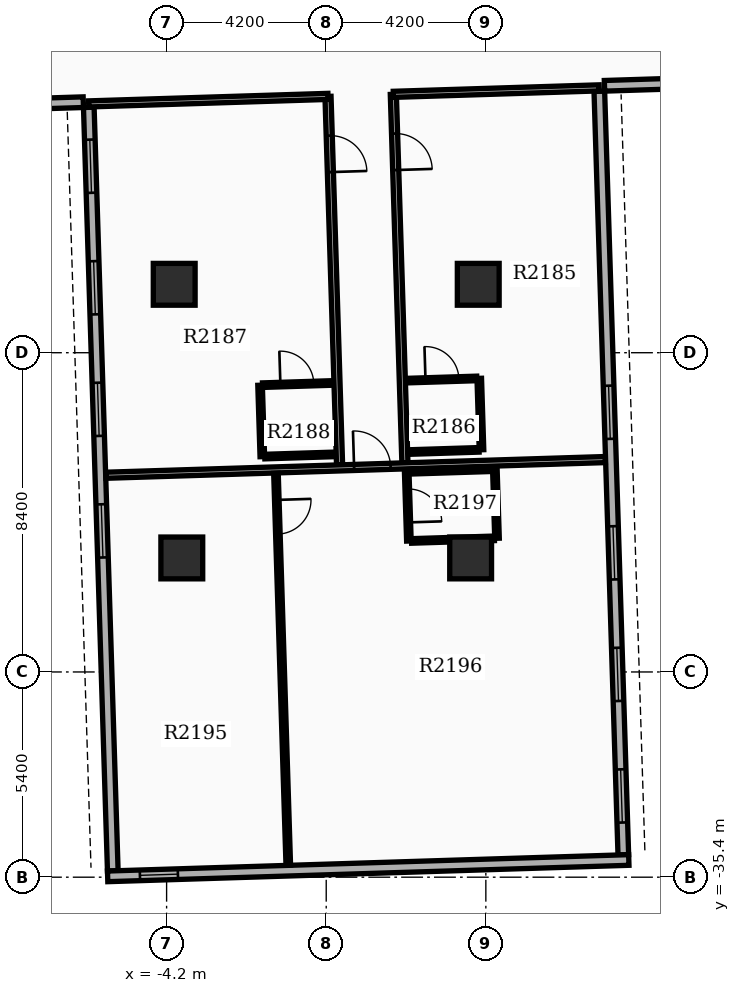
"""IFC4 building model, lengths in metres.
Left out: names, types, materials, properties, quantities, classifications, styles, units other than length and angle.
Written with IfcOpenShell. Run it as: python <this file> out.ifc"""

import sys

from ifc_helpers import new_model, si_unit, direction, frame, frame_2d, origin, origin_2d, place, context, subcontext, project, spatial, rectangle, extrude, element, fill, save


model = new_model("IFC4")
c1 = context("Model", 3, precision=1e-05, world=origin(), true_north=direction((0.0, 1.0)))
c2 = subcontext(c1, "Body", "Model", "MODEL_VIEW")
j1 = project(units=[si_unit("LENGTHUNIT", "METRE"), si_unit("PLANEANGLEUNIT", "RADIAN")], contexts=[c1])
p1 = place(None, origin())
s1 = spatial("IfcSite", under=j1, at=p1, CompositionType="ELEMENT")
p2 = place(p1, origin())
s2 = spatial("IfcBuilding", under=s1, at=p2, CompositionType="ELEMENT")
p3 = place(p2, frame((0.0, 0.0, 135.9)))
s3 = spatial("IfcBuildingStorey", under=s2, at=p3, CompositionType="ELEMENT", Elevation=135.9)
for number, where, z_axis, x_axis in (
    (1, (-4.0, -19.8, 0.0), (0.0, 0.0, 1.0), (1.0, 0.0, 0.0)),
    (2, (4.0, -19.8, 0.0), (0.0, 0.0, 1.0), (1.0, 0.0, 0.0)),
    (3, (-3.8, -27.0, 0.0), (0.0, 0.0, 1.0), (1.0, 0.0, 0.0)),
    (4, (3.8, -27.0, 0.0), (0.0, 0.0, 1.0), (1.0, 0.0, 0.0)),
):
    element("IfcColumn", number, at=place(p3, frame(where, z_axis=z_axis, x_axis=x_axis)), inside=s3, PredefinedType="COLUMN", context=c2, shape_type="SweptSolid", body=[
        extrude(rectangle(XDim=1.1, YDim=1.1, at=origin_2d()), origin(), (0.0, 0.0, 1.0), 3.9),
    ])
p4 = place(p3, frame((-6.247, -15.144, 0.0), z_axis=(0.0, 0.0, 1.0), x_axis=(0.031398187845, -0.999506955354, 0.0)))
e5 = element("IfcWall", 5, at=p4, inside=s3, PredefinedType="STANDARD", context=c2, shape_type="SweptSolid", body=[
    extrude(rectangle(XDim=20.1, YDim=0.28, at=frame_2d((10.05, 0.0))), origin(), (0.0, 0.0, 1.0), 2.97),
])
p5 = place(p4, frame((0.85, 0.0, 0.8)))
e6 = element("IfcOpeningElement", 6, at=p5, cuts=e5, PredefinedType="OPENING", context=c2, shape_type="SweptSolid", body=[
    extrude(rectangle(XDim=1.4, YDim=1.6, at=frame_2d((0.7, 0.8))), frame((0.0, 0.15, 0.0), z_axis=(0.0, -1.0, 0.0), x_axis=(1.0, 0.0, 0.0)), (0.0, 0.0, 1.0), 0.3),
])
p6 = place(p4, frame((4.05, 0.0, 0.8)))
e7 = element("IfcOpeningElement", 7, at=p6, cuts=e5, PredefinedType="OPENING", context=c2, shape_type="SweptSolid", body=[
    extrude(rectangle(XDim=1.4, YDim=1.6, at=frame_2d((0.7, 0.8))), frame((0.0, 0.15, 0.0), z_axis=(0.0, -1.0, 0.0), x_axis=(1.0, 0.0, 0.0)), (0.0, 0.0, 1.0), 0.3),
])
p7 = place(p4, frame((7.25, 0.0, 0.8)))
e8 = element("IfcOpeningElement", 8, at=p7, cuts=e5, PredefinedType="OPENING", context=c2, shape_type="SweptSolid", body=[
    extrude(rectangle(XDim=1.4, YDim=1.6, at=frame_2d((0.7, 0.8))), frame((0.0, 0.15, 0.0), z_axis=(0.0, -1.0, 0.0), x_axis=(1.0, 0.0, 0.0)), (0.0, 0.0, 1.0), 0.3),
])
p8 = place(p4, frame((10.45, 0.0, 0.8)))
e9 = element("IfcOpeningElement", 9, at=p8, cuts=e5, PredefinedType="OPENING", context=c2, shape_type="SweptSolid", body=[
    extrude(rectangle(XDim=1.4, YDim=1.6, at=frame_2d((0.7, 0.8))), frame((0.0, 0.15, 0.0), z_axis=(0.0, -1.0, 0.0), x_axis=(1.0, 0.0, 0.0)), (0.0, 0.0, 1.0), 0.3),
])
p9 = place(p3, frame((7.817, -34.812, 0.0), z_axis=(0.0, 0.0, 1.0), x_axis=(-0.031410322165, 0.999506574096, 0.0)))
e10 = element("IfcWall", 10, at=p9, inside=s3, PredefinedType="STANDARD", context=c2, shape_type="SweptSolid", body=[
    extrude(rectangle(XDim=20.1, YDim=0.28, at=frame_2d((10.05, 0.0))), origin(), (0.0, 0.0, 1.0), 2.97),
])
p10 = place(p9, frame((0.85, 0.0, 0.8)))
e11 = element("IfcOpeningElement", 11, at=p10, cuts=e10, PredefinedType="OPENING", context=c2, shape_type="SweptSolid", body=[
    extrude(rectangle(XDim=1.4, YDim=1.6, at=frame_2d((0.7, 0.8))), frame((0.0, 0.15, 0.0), z_axis=(0.0, -1.0, 0.0), x_axis=(1.0, 0.0, 0.0)), (0.0, 0.0, 1.0), 0.3),
])
p11 = place(p9, frame((4.05, 0.0, 0.8)))
e12 = element("IfcOpeningElement", 12, at=p11, cuts=e10, PredefinedType="OPENING", context=c2, shape_type="SweptSolid", body=[
    extrude(rectangle(XDim=1.4, YDim=1.6, at=frame_2d((0.7, 0.8))), frame((0.0, 0.15, 0.0), z_axis=(0.0, -1.0, 0.0), x_axis=(1.0, 0.0, 0.0)), (0.0, 0.0, 1.0), 0.3),
])
p12 = place(p9, frame((7.25, 0.0, 0.8)))
e13 = element("IfcOpeningElement", 13, at=p12, cuts=e10, PredefinedType="OPENING", context=c2, shape_type="SweptSolid", body=[
    extrude(rectangle(XDim=1.4, YDim=1.6, at=frame_2d((0.7, 0.8))), frame((0.0, 0.15, 0.0), z_axis=(0.0, -1.0, 0.0), x_axis=(1.0, 0.0, 0.0)), (0.0, 0.0, 1.0), 0.3),
])
p13 = place(p9, frame((10.95, 0.0, 0.8)))
e14 = element("IfcOpeningElement", 14, at=p13, cuts=e10, PredefinedType="OPENING", context=c2, shape_type="SweptSolid", body=[
    extrude(rectangle(XDim=1.4, YDim=1.6, at=frame_2d((0.7, 0.8))), frame((0.0, 0.15, 0.0), z_axis=(0.0, -1.0, 0.0), x_axis=(1.0, 0.0, 0.0)), (0.0, 0.0, 1.0), 0.3),
])
p14 = place(p3, frame((-5.752, -35.378, 0.0), z_axis=(0.0, 0.0, 1.0), x_axis=(0.999506679556, 0.031406966164, 0.0)))
e15 = element("IfcWall", 15, at=p14, inside=s3, PredefinedType="STANDARD", context=c2, shape_type="SweptSolid", body=[
    extrude(rectangle(XDim=13.72, YDim=0.28, at=frame_2d((6.86, 0.0))), origin(), (0.0, 0.0, 1.0), 2.97),
])
p15 = place(p14, frame((0.85, 0.0, 0.85)))
e16 = element("IfcOpeningElement", 16, at=p15, cuts=e15, PredefinedType="OPENING", context=c2, shape_type="SweptSolid", body=[
    extrude(rectangle(XDim=1.0, YDim=1.5, at=frame_2d((0.5, 0.75))), frame((0.0, 0.15, 0.0), z_axis=(0.0, -1.0, 0.0), x_axis=(1.0, 0.0, 0.0)), (0.0, 0.0, 1.0), 0.3),
])
p16 = place(p3, frame((-12.689, -15.206, 0.0), z_axis=(0.0, 0.0, 1.0), x_axis=(0.999507262922, 0.031388395416, 0.0)))
e17 = element("IfcWall", 17, at=p16, inside=s3, PredefinedType="STANDARD", context=c2, shape_type="SweptSolid", body=[
    extrude(rectangle(XDim=6.3, YDim=0.28, at=frame_2d((3.15, 0.0))), origin(), (0.0, 0.0, 1.0), 2.97),
])
p17 = place(p3, frame((13.618, -14.379, 0.0), z_axis=(0.0, 0.0, 1.0), x_axis=(-0.999507224741, -0.031389611199, 0.0)))
e18 = element("IfcWall", 18, at=p17, inside=s3, PredefinedType="STANDARD", context=c2, shape_type="SweptSolid", body=[
    extrude(rectangle(XDim=6.3, YDim=0.28, at=frame_2d((3.15, 0.0))), origin(), (0.0, 0.0, 1.0), 2.97),
])
p18 = place(p3, frame((1.766, -14.802, 0.0), z_axis=(0.0, 0.0, 1.0), x_axis=(0.031410762168, -0.999506560269, 0.0)))
e19 = element("IfcWall", 19, at=p18, inside=s3, PredefinedType="PARTITIONING", context=c2, shape_type="SweptSolid", body=[
    extrude(rectangle(XDim=9.7, YDim=0.16, at=frame_2d((4.85, 0.0))), origin(), (0.0, 0.0, 1.0), 2.96),
])
p19 = place(p18, frame((1.033, 0.0, 0.0)))
e20 = element("IfcOpeningElement", 20, at=p19, cuts=e19, PredefinedType="OPENING", context=c2, shape_type="SweptSolid", body=[
    extrude(rectangle(XDim=0.96, YDim=2.15, at=frame_2d((0.48, 1.075))), frame((0.0, 0.09, 0.0), z_axis=(0.0, -1.0, 0.0), x_axis=(1.0, 0.0, 0.0)), (0.0, 0.0, 1.0), 0.18),
])
p20 = place(p3, frame((1.766, -14.802, 0.0), z_axis=(0.0, 0.0, 1.0), x_axis=(0.999507009157, 0.031396475072, 0.0)))
e21 = element("IfcWall", 21, at=p20, inside=s3, PredefinedType="PARTITIONING", context=c2, shape_type="SweptSolid", body=[
    extrude(rectangle(XDim=5.42, YDim=0.16, at=frame_2d((2.71, 0.0))), origin(), (0.0, 0.0, 1.0), 2.96),
])
p21 = place(p3, frame((2.143, -22.334, 0.0), z_axis=(0.0, 0.0, 1.0), x_axis=(0.999507221803, 0.031389704724, 0.0)))
e22 = element("IfcWall", 22, at=p21, inside=s3, PredefinedType="PARTITIONING", context=c2, shape_type="SweptSolid", body=[
    extrude(rectangle(XDim=1.82, YDim=0.12, at=frame_2d((0.91, 0.0))), origin(), (0.0, 0.0, 1.0), 2.96),
])
p22 = place(p21, frame((0.47, 0.0, 0.0)))
e23 = element("IfcOpeningElement", 23, at=p22, cuts=e22, PredefinedType="OPENING", context=c2, shape_type="SweptSolid", body=[
    extrude(rectangle(XDim=0.88, YDim=2.1, at=frame_2d((0.44, 1.05))), frame((0.0, 0.07, 0.0), z_axis=(0.0, -1.0, 0.0), x_axis=(1.0, 0.0, 0.0)), (0.0, 0.0, 1.0), 0.14),
])
p23 = place(p3, frame((2.202, -24.213, 0.0), z_axis=(0.0, 0.0, 1.0), x_axis=(0.999503004171, 0.03152371574, 0.0)))
e24 = element("IfcWall", 24, at=p23, inside=s3, PredefinedType="PARTITIONING", context=c2, shape_type="SweptSolid", body=[
    extrude(rectangle(XDim=1.82, YDim=0.12, at=frame_2d((0.91, 0.0))), origin(), (0.0, 0.0, 1.0), 2.96),
])
p24 = place(p3, frame((4.027, -22.274, 0.0), z_axis=(0.0, 0.0, 1.0), x_axis=(0.031425292588, -0.999506103526, 0.0)))
e25 = element("IfcWall", 25, at=p24, inside=s3, PredefinedType="PARTITIONING", context=c2, shape_type="SweptSolid", body=[
    extrude(rectangle(XDim=1.88, YDim=0.12, at=frame_2d((0.94, 0.0))), origin(), (0.0, 0.0, 1.0), 2.96),
])
p25 = place(p3, frame((0.047, -14.856, 0.0), z_axis=(0.0, 0.0, 1.0), x_axis=(0.031411552371, -0.999506535435, 0.0)))
e26 = element("IfcWall", 26, at=p25, inside=s3, PredefinedType="PARTITIONING", context=c2, shape_type="SweptSolid", body=[
    extrude(rectangle(XDim=9.7, YDim=0.16, at=frame_2d((4.85, 0.0))), origin(), (0.0, 0.0, 1.0), 2.96),
])
p26 = place(p25, frame((1.033, 0.0, 0.0)))
e27 = element("IfcOpeningElement", 27, at=p26, cuts=e26, PredefinedType="OPENING", context=c2, shape_type="SweptSolid", body=[
    extrude(rectangle(XDim=0.96, YDim=2.15, at=frame_2d((0.48, 1.075))), frame((0.0, 0.09, 0.0), z_axis=(0.0, -1.0, 0.0), x_axis=(1.0, 0.0, 0.0)), (0.0, 0.0, 1.0), 0.18),
])
p27 = place(p3, frame((0.047, -14.856, 0.0), z_axis=(0.0, 0.0, 1.0), x_axis=(-0.999507224741, -0.031389611199, 0.0)))
e28 = element("IfcWall", 28, at=p27, inside=s3, PredefinedType="PARTITIONING", context=c2, shape_type="SweptSolid", body=[
    extrude(rectangle(XDim=6.3, YDim=0.16, at=frame_2d((3.15, 0.0))), origin(), (0.0, 0.0, 1.0), 2.96),
])
p28 = place(p3, frame((-1.676, -22.454, 0.0), z_axis=(0.0, 0.0, 1.0), x_axis=(0.999507221803, 0.031389704724, 0.0)))
e29 = element("IfcWall", 29, at=p28, inside=s3, PredefinedType="PARTITIONING", context=c2, shape_type="SweptSolid", body=[
    extrude(rectangle(XDim=1.82, YDim=0.12, at=frame_2d((0.91, 0.0))), origin(), (0.0, 0.0, 1.0), 2.96),
])
p29 = place(p28, frame((0.47, 0.0, 0.0)))
e30 = element("IfcOpeningElement", 30, at=p29, cuts=e29, PredefinedType="OPENING", context=c2, shape_type="SweptSolid", body=[
    extrude(rectangle(XDim=0.88, YDim=2.1, at=frame_2d((0.44, 1.05))), frame((0.0, 0.07, 0.0), z_axis=(0.0, -1.0, 0.0), x_axis=(1.0, 0.0, 0.0)), (0.0, 0.0, 1.0), 0.14),
])
p30 = place(p3, frame((-1.616, -24.333, 0.0), z_axis=(0.0, 0.0, 1.0), x_axis=(0.999507221803, 0.031389704724, 0.0)))
e31 = element("IfcWall", 31, at=p30, inside=s3, PredefinedType="PARTITIONING", context=c2, shape_type="SweptSolid", body=[
    extrude(rectangle(XDim=1.82, YDim=0.12, at=frame_2d((0.91, 0.0))), origin(), (0.0, 0.0, 1.0), 2.96),
])
p31 = place(p3, frame((-1.74, -22.456, 0.0), z_axis=(0.0, 0.0, 1.0), x_axis=(0.031429371883, -0.999505975261, 0.0)))
e32 = element("IfcWall", 32, at=p31, inside=s3, PredefinedType="PARTITIONING", context=c2, shape_type="SweptSolid", body=[
    extrude(rectangle(XDim=1.88, YDim=0.12, at=frame_2d((0.94, 0.0))), origin(), (0.0, 0.0, 1.0), 2.96),
])
p32 = place(p3, frame((-5.795, -24.824, 0.0), z_axis=(0.0, 0.0, 1.0), x_axis=(0.999507189267, 0.031390740738, 0.0)))
e33 = element("IfcWall", 33, at=p32, inside=s3, PredefinedType="PARTITIONING", context=c2, shape_type="SweptSolid", body=[
    extrude(rectangle(XDim=13.144, YDim=0.16, at=frame_2d((6.572, 0.0))), origin(), (0.0, 0.0, 1.0), 2.96),
])
p33 = place(p32, frame((6.532, 0.0, 0.0)))
e34 = element("IfcOpeningElement", 34, at=p33, cuts=e33, PredefinedType="OPENING", context=c2, shape_type="SweptSolid", body=[
    extrude(rectangle(XDim=0.96, YDim=2.15, at=frame_2d((0.48, 1.075))), frame((0.0, 0.09, 0.0), z_axis=(0.0, -1.0, 0.0), x_axis=(1.0, 0.0, 0.0)), (0.0, 0.0, 1.0), 0.18),
])
p34 = place(p3, frame((-1.323, -24.774, 0.0), z_axis=(0.0, 0.0, 1.0), x_axis=(0.031416574993, -0.999506377576, 0.0)))
e35 = element("IfcWall", 35, at=p34, inside=s3, PredefinedType="PARTITIONING", context=c2, shape_type="SweptSolid", body=[
    extrude(rectangle(XDim=10.312, YDim=0.12, at=frame_2d((5.156, 0.0))), origin(), (0.0, 0.0, 1.0), 2.96),
])
p35 = place(p34, frame((0.7, 0.0, 0.0)))
e36 = element("IfcOpeningElement", 36, at=p35, cuts=e35, PredefinedType="OPENING", context=c2, shape_type="SweptSolid", body=[
    extrude(rectangle(XDim=0.9, YDim=2.1, at=frame_2d((0.45, 1.05))), frame((0.0, 0.07, 0.0), z_axis=(0.0, -1.0, 0.0), x_axis=(1.0, 0.0, 0.0)), (0.0, 0.0, 1.0), 0.14),
])
p36 = place(p3, frame((2.118, -24.736, 0.0), z_axis=(0.0, 0.0, 1.0), x_axis=(0.03152371574, -0.999503004171, 0.0)))
e37 = element("IfcWall", 37, at=p36, inside=s3, PredefinedType="PARTITIONING", context=c2, shape_type="SweptSolid", body=[
    extrude(rectangle(XDim=1.82, YDim=0.12, at=frame_2d((0.91, 0.0))), origin(), (0.0, 0.0, 1.0), 2.96),
])
p37 = place(p36, frame((0.45, 0.0, 0.0)))
e38 = element("IfcOpeningElement", 38, at=p37, cuts=e37, PredefinedType="OPENING", context=c2, shape_type="SweptSolid", body=[
    extrude(rectangle(XDim=0.88, YDim=2.1, at=frame_2d((0.44, 1.05))), frame((0.0, 0.07, 0.0), z_axis=(0.0, -1.0, 0.0), x_axis=(1.0, 0.0, 0.0)), (0.0, 0.0, 1.0), 0.14),
])
p38 = place(p3, frame((4.437, -24.663, 0.0), z_axis=(0.0, 0.0, 1.0), x_axis=(0.031255692016, -0.999511421504, 0.0)))
e39 = element("IfcWall", 39, at=p38, inside=s3, PredefinedType="PARTITIONING", context=c2, shape_type="SweptSolid", body=[
    extrude(rectangle(XDim=1.82, YDim=0.12, at=frame_2d((0.91, 0.0))), origin(), (0.0, 0.0, 1.0), 2.96),
])
for number, where, z_axis, x_axis in (
    (40, (2.188, -24.733, 0.0), (0.0, 0.0, 1.0), (1.0, 0.031, 0.0)),
    (41, (2.245, -26.552, 0.0), (0.0, 0.0, 1.0), (1.0, 0.031, 0.0)),
):
    element("IfcWall", number, at=place(p3, frame(where, z_axis=z_axis, x_axis=x_axis)), inside=s3, PredefinedType="PARTITIONING", context=c2, shape_type="SweptSolid", body=[
        extrude(rectangle(XDim=2.18, YDim=0.12, at=frame_2d((1.09, 0.0))), origin(), (0.0, 0.0, 1.0), 2.96),
    ])
p39 = place(p5, origin())
e42 = element("IfcWindow", 42, at=p39, inside=s3, PartitioningType="SINGLE_PANEL", PredefinedType="WINDOW", context=c2, shape_type="SweptSolid", body=[
    extrude(rectangle(XDim=1.4, YDim=1.6, at=frame_2d((0.7, 0.8))), frame((0.0, 0.03, 0.0), z_axis=(0.0, -1.0, 0.0), x_axis=(1.0, 0.0, 0.0)), (0.0, 0.0, 1.0), 0.06),
])
fill(e6, e42)
p40 = place(p6, origin())
e43 = element("IfcWindow", 43, at=p40, inside=s3, PartitioningType="SINGLE_PANEL", PredefinedType="WINDOW", context=c2, shape_type="SweptSolid", body=[
    extrude(rectangle(XDim=1.4, YDim=1.6, at=frame_2d((0.7, 0.8))), frame((0.0, 0.03, 0.0), z_axis=(0.0, -1.0, 0.0), x_axis=(1.0, 0.0, 0.0)), (0.0, 0.0, 1.0), 0.06),
])
fill(e7, e43)
p41 = place(p7, origin())
e44 = element("IfcWindow", 44, at=p41, inside=s3, PartitioningType="SINGLE_PANEL", PredefinedType="WINDOW", context=c2, shape_type="SweptSolid", body=[
    extrude(rectangle(XDim=1.4, YDim=1.6, at=frame_2d((0.7, 0.8))), frame((0.0, 0.03, 0.0), z_axis=(0.0, -1.0, 0.0), x_axis=(1.0, 0.0, 0.0)), (0.0, 0.0, 1.0), 0.06),
])
fill(e8, e44)
p42 = place(p8, origin())
e45 = element("IfcWindow", 45, at=p42, inside=s3, PartitioningType="SINGLE_PANEL", PredefinedType="WINDOW", context=c2, shape_type="SweptSolid", body=[
    extrude(rectangle(XDim=1.4, YDim=1.6, at=frame_2d((0.7, 0.8))), frame((0.0, 0.03, 0.0), z_axis=(0.0, -1.0, 0.0), x_axis=(1.0, 0.0, 0.0)), (0.0, 0.0, 1.0), 0.06),
])
fill(e9, e45)
p43 = place(p10, origin())
e46 = element("IfcWindow", 46, at=p43, inside=s3, PartitioningType="SINGLE_PANEL", PredefinedType="WINDOW", context=c2, shape_type="SweptSolid", body=[
    extrude(rectangle(XDim=1.4, YDim=1.6, at=frame_2d((0.7, 0.8))), frame((0.0, 0.03, 0.0), z_axis=(0.0, -1.0, 0.0), x_axis=(1.0, 0.0, 0.0)), (0.0, 0.0, 1.0), 0.06),
])
fill(e11, e46)
p44 = place(p11, origin())
e47 = element("IfcWindow", 47, at=p44, inside=s3, PartitioningType="SINGLE_PANEL", PredefinedType="WINDOW", context=c2, shape_type="SweptSolid", body=[
    extrude(rectangle(XDim=1.4, YDim=1.6, at=frame_2d((0.7, 0.8))), frame((0.0, 0.03, 0.0), z_axis=(0.0, -1.0, 0.0), x_axis=(1.0, 0.0, 0.0)), (0.0, 0.0, 1.0), 0.06),
])
fill(e12, e47)
p45 = place(p12, origin())
e48 = element("IfcWindow", 48, at=p45, inside=s3, PartitioningType="SINGLE_PANEL", PredefinedType="WINDOW", context=c2, shape_type="SweptSolid", body=[
    extrude(rectangle(XDim=1.4, YDim=1.6, at=frame_2d((0.7, 0.8))), frame((0.0, 0.03, 0.0), z_axis=(0.0, -1.0, 0.0), x_axis=(1.0, 0.0, 0.0)), (0.0, 0.0, 1.0), 0.06),
])
fill(e13, e48)
p46 = place(p13, origin())
e49 = element("IfcWindow", 49, at=p46, inside=s3, PartitioningType="SINGLE_PANEL", PredefinedType="WINDOW", context=c2, shape_type="SweptSolid", body=[
    extrude(rectangle(XDim=1.4, YDim=1.6, at=frame_2d((0.7, 0.8))), frame((0.0, 0.03, 0.0), z_axis=(0.0, -1.0, 0.0), x_axis=(1.0, 0.0, 0.0)), (0.0, 0.0, 1.0), 0.06),
])
fill(e14, e49)
p47 = place(p15, origin())
e50 = element("IfcWindow", 50, at=p47, inside=s3, PartitioningType="SINGLE_PANEL", PredefinedType="WINDOW", context=c2, shape_type="SweptSolid", body=[
    extrude(rectangle(XDim=1.0, YDim=1.5, at=frame_2d((0.5, 0.75))), frame((0.0, 0.03, 0.0), z_axis=(0.0, -1.0, 0.0), x_axis=(1.0, 0.0, 0.0)), (0.0, 0.0, 1.0), 0.06),
])
fill(e16, e50)
p48 = place(p19, origin())
e51 = element("IfcDoor", 51, at=p48, inside=s3, OperationType="SINGLE_SWING_RIGHT", PredefinedType="DOOR", context=c2, shape_type="SweptSolid", body=[
    extrude(rectangle(XDim=0.96, YDim=2.15, at=frame_2d((0.48, 1.075))), frame((0.0, 0.025, 0.0), z_axis=(0.0, -1.0, 0.0), x_axis=(1.0, 0.0, 0.0)), (0.0, 0.0, 1.0), 0.05),
])
fill(e20, e51)
p49 = place(p22, origin())
e52 = element("IfcDoor", 52, at=p49, inside=s3, OperationType="SINGLE_SWING_LEFT", PredefinedType="DOOR", context=c2, shape_type="SweptSolid", body=[
    extrude(rectangle(XDim=0.88, YDim=2.1, at=frame_2d((0.44, 1.05))), frame((0.0, 0.025, 0.0), z_axis=(0.0, -1.0, 0.0), x_axis=(1.0, 0.0, 0.0)), (0.0, 0.0, 1.0), 0.05),
])
fill(e23, e52)
p50 = place(p26, origin())
e53 = element("IfcDoor", 53, at=p50, inside=s3, OperationType="SINGLE_SWING_RIGHT", PredefinedType="DOOR", context=c2, shape_type="SweptSolid", body=[
    extrude(rectangle(XDim=0.96, YDim=2.15, at=frame_2d((0.48, 1.075))), frame((0.0, 0.025, 0.0), z_axis=(0.0, -1.0, 0.0), x_axis=(1.0, 0.0, 0.0)), (0.0, 0.0, 1.0), 0.05),
])
fill(e27, e53)
p51 = place(p29, origin())
e54 = element("IfcDoor", 54, at=p51, inside=s3, OperationType="SINGLE_SWING_LEFT", PredefinedType="DOOR", context=c2, shape_type="SweptSolid", body=[
    extrude(rectangle(XDim=0.88, YDim=2.1, at=frame_2d((0.44, 1.05))), frame((0.0, 0.025, 0.0), z_axis=(0.0, -1.0, 0.0), x_axis=(1.0, 0.0, 0.0)), (0.0, 0.0, 1.0), 0.05),
])
fill(e30, e54)
p52 = place(p33, origin())
e55 = element("IfcDoor", 55, at=p52, inside=s3, OperationType="SINGLE_SWING_LEFT", PredefinedType="DOOR", context=c2, shape_type="SweptSolid", body=[
    extrude(rectangle(XDim=0.96, YDim=2.15, at=frame_2d((0.48, 1.075))), frame((0.0, 0.025, 0.0), z_axis=(0.0, -1.0, 0.0), x_axis=(1.0, 0.0, 0.0)), (0.0, 0.0, 1.0), 0.05),
])
fill(e34, e55)
p53 = place(p35, origin())
e56 = element("IfcDoor", 56, at=p53, inside=s3, OperationType="SINGLE_SWING_LEFT", PredefinedType="DOOR", context=c2, shape_type="SweptSolid", body=[
    extrude(rectangle(XDim=0.9, YDim=2.1, at=frame_2d((0.45, 1.05))), frame((0.0, 0.025, 0.0), z_axis=(0.0, -1.0, 0.0), x_axis=(1.0, 0.0, 0.0)), (0.0, 0.0, 1.0), 0.05),
])
fill(e36, e56)
p54 = place(p37, origin())
e57 = element("IfcDoor", 57, at=p54, inside=s3, OperationType="SINGLE_SWING_RIGHT", PredefinedType="DOOR", context=c2, shape_type="SweptSolid", body=[
    extrude(rectangle(XDim=0.88, YDim=2.1, at=frame_2d((0.44, 1.05))), frame((0.0, 0.025, 0.0), z_axis=(0.0, -1.0, 0.0), x_axis=(1.0, 0.0, 0.0)), (0.0, 0.0, 1.0), 0.05),
])
fill(e38, e57)
save(model, sys.argv[1])
